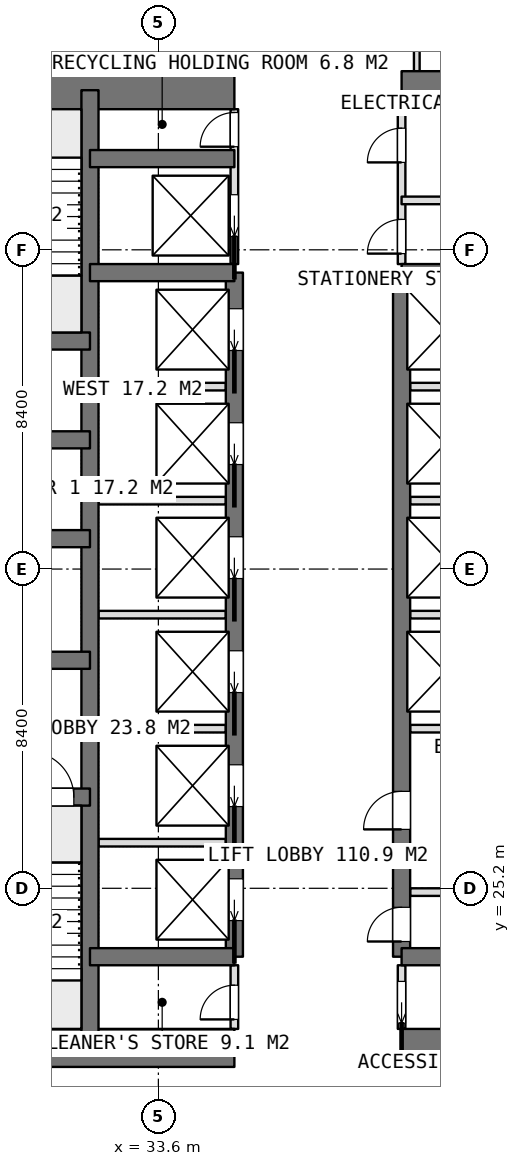
"""IFC4 building model, lengths in metres.
Left out: names, types, materials, properties, quantities, classifications, styles, units other than length and angle.
Written with IfcOpenShell. Run it as: python <this file> out.ifc"""

import sys

from ifc_helpers import new_model, si_unit, direction, frame, frame_2d, origin, place, context, subcontext, project, spatial, rectangle, extrude, element, fill, save


model = new_model("IFC4")
c1 = context("Model", 3, precision=1e-05, world=origin(), true_north=direction((0.0, 1.0)))
c2 = subcontext(c1, "Body", "Model", "MODEL_VIEW")
j1 = project(units=[si_unit("LENGTHUNIT", "METRE"), si_unit("PLANEANGLEUNIT", "RADIAN")], contexts=[c1])
p1 = place(None, origin())
s1 = spatial("IfcSite", under=j1, at=p1, CompositionType="ELEMENT")
p2 = place(p1, origin())
s2 = spatial("IfcBuilding", under=s1, at=p2, CompositionType="ELEMENT")
p3 = place(p2, frame((0.0, 0.0, 106.55)))
s3 = spatial("IfcBuildingStorey", under=s2, at=p3, CompositionType="ELEMENT", Elevation=106.55)
p4 = place(p3, frame((25.2, 21.0, 0.0), z_axis=(0.0, 0.0, 1.0), x_axis=(1.0, 0.0, 0.0)))
e1 = element("IfcWall", 1, at=p4, inside=s3, PredefinedType="SHEAR", context=c2, shape_type="SweptSolid", body=[
    extrude(rectangle(XDim=10.4, YDim=1.0, at=frame_2d((5.2, 0.0))), origin(), (0.0, 0.0, 1.0), 3.75),
])
p5 = place(p3, frame((40.0, 21.0, 0.0), z_axis=(0.0, 0.0, 1.0), x_axis=(1.0, 0.0, 0.0)))
e2 = element("IfcWall", 2, at=p5, inside=s3, PredefinedType="SHEAR", context=c2, shape_type="SweptSolid", body=[
    extrude(rectangle(XDim=10.4, YDim=1.0, at=frame_2d((5.2, 0.0))), origin(), (0.0, 0.0, 1.0), 3.75),
])
p6 = place(p3, frame((25.2, 46.2, 0.0), z_axis=(0.0, 0.0, 1.0), x_axis=(1.0, 0.0, 0.0)))
e3 = element("IfcWall", 3, at=p6, inside=s3, PredefinedType="SHEAR", context=c2, shape_type="SweptSolid", body=[
    extrude(rectangle(XDim=10.4, YDim=1.0, at=frame_2d((5.2, 0.0))), origin(), (0.0, 0.0, 1.0), 3.75),
])
p7 = place(p3, frame((40.0, 46.2, 0.0), z_axis=(0.0, 0.0, 1.0), x_axis=(1.0, 0.0, 0.0)))
e4 = element("IfcWall", 4, at=p7, inside=s3, PredefinedType="SHEAR", context=c2, shape_type="SweptSolid", body=[
    extrude(rectangle(XDim=10.4, YDim=1.0, at=frame_2d((5.2, 0.0))), origin(), (0.0, 0.0, 1.0), 3.75),
])
p8 = place(p3, frame((31.8, 21.0, 0.0), z_axis=(0.0, 0.0, 1.0), x_axis=(0.0, 1.0, 0.0)))
e5 = element("IfcWall", 5, at=p8, inside=s3, PredefinedType="SHEAR", context=c2, shape_type="SweptSolid", body=[
    extrude(rectangle(XDim=25.2, YDim=0.45, at=frame_2d((12.6, 0.0))), origin(), (0.0, 0.0, 1.0), 3.75),
])
p9 = place(p3, frame((35.6, 23.4, 0.0), z_axis=(0.0, 0.0, 1.0), x_axis=(0.0, 1.0, 0.0)))
e6 = element("IfcWall", 6, at=p9, inside=s3, PredefinedType="SHEAR", context=c2, shape_type="SweptSolid", body=[
    extrude(rectangle(XDim=18.0, YDim=0.45, at=frame_2d((9.0, 0.0))), origin(), (0.0, 0.0, 1.0), 3.75),
])
p10 = place(p9, frame((0.95, 0.0, 0.0)))
e7 = element("IfcOpeningElement", 7, at=p10, cuts=e6, PredefinedType="OPENING", context=c2, shape_type="SweptSolid", body=[
    extrude(rectangle(XDim=1.1, YDim=2.1, at=frame_2d((0.55, 1.05))), frame((0.0, 0.235, 0.0), z_axis=(0.0, -1.0, 0.0), x_axis=(1.0, 0.0, 0.0)), (0.0, 0.0, 1.0), 0.47),
])
p11 = place(p9, frame((3.95, 0.0, 0.0)))
e8 = element("IfcOpeningElement", 8, at=p11, cuts=e6, PredefinedType="OPENING", context=c2, shape_type="SweptSolid", body=[
    extrude(rectangle(XDim=1.1, YDim=2.1, at=frame_2d((0.55, 1.05))), frame((0.0, 0.235, 0.0), z_axis=(0.0, -1.0, 0.0), x_axis=(1.0, 0.0, 0.0)), (0.0, 0.0, 1.0), 0.47),
])
p12 = place(p9, frame((6.95, 0.0, 0.0)))
e9 = element("IfcOpeningElement", 9, at=p12, cuts=e6, PredefinedType="OPENING", context=c2, shape_type="SweptSolid", body=[
    extrude(rectangle(XDim=1.1, YDim=2.1, at=frame_2d((0.55, 1.05))), frame((0.0, 0.235, 0.0), z_axis=(0.0, -1.0, 0.0), x_axis=(1.0, 0.0, 0.0)), (0.0, 0.0, 1.0), 0.47),
])
p13 = place(p9, frame((9.95, 0.0, 0.0)))
e10 = element("IfcOpeningElement", 10, at=p13, cuts=e6, PredefinedType="OPENING", context=c2, shape_type="SweptSolid", body=[
    extrude(rectangle(XDim=1.1, YDim=2.1, at=frame_2d((0.55, 1.05))), frame((0.0, 0.235, 0.0), z_axis=(0.0, -1.0, 0.0), x_axis=(1.0, 0.0, 0.0)), (0.0, 0.0, 1.0), 0.47),
])
p14 = place(p9, frame((12.95, 0.0, 0.0)))
e11 = element("IfcOpeningElement", 11, at=p14, cuts=e6, PredefinedType="OPENING", context=c2, shape_type="SweptSolid", body=[
    extrude(rectangle(XDim=1.1, YDim=2.1, at=frame_2d((0.55, 1.05))), frame((0.0, 0.235, 0.0), z_axis=(0.0, -1.0, 0.0), x_axis=(1.0, 0.0, 0.0)), (0.0, 0.0, 1.0), 0.47),
])
p15 = place(p9, frame((15.95, 0.0, 0.0)))
e12 = element("IfcOpeningElement", 12, at=p15, cuts=e6, PredefinedType="OPENING", context=c2, shape_type="SweptSolid", body=[
    extrude(rectangle(XDim=1.1, YDim=2.1, at=frame_2d((0.55, 1.05))), frame((0.0, 0.235, 0.0), z_axis=(0.0, -1.0, 0.0), x_axis=(1.0, 0.0, 0.0)), (0.0, 0.0, 1.0), 0.47),
])
p16 = place(p3, frame((40.0, 23.4, 0.0), z_axis=(0.0, 0.0, 1.0), x_axis=(0.0, 1.0, 0.0)))
e13 = element("IfcWall", 13, at=p16, inside=s3, PredefinedType="SHEAR", context=c2, shape_type="SweptSolid", body=[
    extrude(rectangle(XDim=18.0, YDim=0.45, at=frame_2d((9.0, 0.0))), origin(), (0.0, 0.0, 1.0), 3.75),
])
p17 = place(p16, frame((0.4, 0.0, 0.0)))
e14 = element("IfcOpeningElement", 14, at=p17, cuts=e13, PredefinedType="OPENING", context=c2, shape_type="SweptSolid", body=[
    extrude(rectangle(XDim=0.9, YDim=2.1, at=frame_2d((0.45, 1.05))), frame((0.0, 0.235, 0.0), z_axis=(0.0, -1.0, 0.0), x_axis=(1.0, 0.0, 0.0)), (0.0, 0.0, 1.0), 0.47),
])
p18 = place(p16, frame((3.35, 0.0, 0.0)))
e15 = element("IfcOpeningElement", 15, at=p18, cuts=e13, PredefinedType="OPENING", context=c2, shape_type="SweptSolid", body=[
    extrude(rectangle(XDim=1.0, YDim=2.1, at=frame_2d((0.5, 1.05))), frame((0.0, 0.235, 0.0), z_axis=(0.0, -1.0, 0.0), x_axis=(1.0, 0.0, 0.0)), (0.0, 0.0, 1.0), 0.47),
])
for number, where, z_axis, x_axis in (
    (16, (31.8, 23.4, 0.0), (0.0, 0.0, 1.0), (1.0, 0.0, 0.0)),
    (17, (31.8, 41.4, 0.0), (0.0, 0.0, 1.0), (1.0, 0.0, 0.0)),
    (18, (31.8, 44.4, 0.0), (0.0, 0.0, 1.0), (1.0, 0.0, 0.0)),
    (19, (40.0, 23.4, 0.0), (0.0, 0.0, 1.0), (1.0, 0.0, 0.0)),
    (20, (40.0, 41.4, 0.0), (0.0, 0.0, 1.0), (1.0, 0.0, 0.0)),
):
    element("IfcWall", number, at=place(p3, frame(where, z_axis=z_axis, x_axis=x_axis)), inside=s3, PredefinedType="SHEAR", context=c2, shape_type="SweptSolid", body=[
        extrude(rectangle(XDim=3.8, YDim=0.45, at=frame_2d((1.9, 0.0))), origin(), (0.0, 0.0, 1.0), 3.75),
    ])
p19 = place(p3, frame((25.2, 27.6, 0.0), z_axis=(0.0, 0.0, 1.0), x_axis=(1.0, 0.0, 0.0)))
e21 = element("IfcWall", 21, at=p19, inside=s3, PredefinedType="SHEAR", context=c2, shape_type="SweptSolid", body=[
    extrude(rectangle(XDim=6.6, YDim=0.45, at=frame_2d((3.3, 0.0))), origin(), (0.0, 0.0, 1.0), 3.75),
])
p20 = place(p19, frame((4.975, 0.0, 0.0)))
e22 = element("IfcOpeningElement", 22, at=p20, cuts=e21, PredefinedType="OPENING", context=c2, shape_type="SweptSolid", body=[
    extrude(rectangle(XDim=1.2, YDim=2.1, at=frame_2d((0.6, 1.05))), frame((0.0, 0.235, 0.0), z_axis=(0.0, -1.0, 0.0), x_axis=(1.0, 0.0, 0.0)), (0.0, 0.0, 1.0), 0.47),
])
p21 = place(p3, frame((25.2, 31.2, 0.0), z_axis=(0.0, 0.0, 1.0), x_axis=(1.0, 0.0, 0.0)))
e23 = element("IfcWall", 23, at=p21, inside=s3, PredefinedType="SHEAR", context=c2, shape_type="SweptSolid", body=[
    extrude(rectangle(XDim=6.6, YDim=0.45, at=frame_2d((3.3, 0.0))), origin(), (0.0, 0.0, 1.0), 3.75),
])
p22 = place(p21, frame((2.65, 0.0, 0.0)))
e24 = element("IfcOpeningElement", 24, at=p22, cuts=e23, PredefinedType="OPENING", context=c2, shape_type="SweptSolid", body=[
    extrude(rectangle(XDim=1.3, YDim=2.1, at=frame_2d((0.65, 1.05))), frame((0.0, 0.235, 0.0), z_axis=(0.0, -1.0, 0.0), x_axis=(1.0, 0.0, 0.0)), (0.0, 0.0, 1.0), 0.47),
])
for number, where, z_axis, x_axis in (
    (25, (25.2, 34.4, 0.0), (0.0, 0.0, 1.0), (1.0, 0.0, 0.0)),
    (26, (25.2, 37.0, 0.0), (0.0, 0.0, 1.0), (1.0, 0.0, 0.0)),
    (27, (25.2, 39.6, 0.0), (0.0, 0.0, 1.0), (1.0, 0.0, 0.0)),
):
    element("IfcWall", number, at=place(p3, frame(where, z_axis=z_axis, x_axis=x_axis)), inside=s3, PredefinedType="SHEAR", context=c2, shape_type="SweptSolid", body=[
        extrude(rectangle(XDim=6.6, YDim=0.45, at=frame_2d((3.3, 0.0))), origin(), (0.0, 0.0, 1.0), 3.75),
    ])
for number, where, z_axis, x_axis in (
    (28, (32.025, 26.4, 0.0), (0.0, 0.0, 1.0), (1.0, 0.0, 0.0)),
    (29, (32.025, 29.4, 0.0), (0.0, 0.0, 1.0), (1.0, 0.0, 0.0)),
    (30, (32.025, 32.4, 0.0), (0.0, 0.0, 1.0), (1.0, 0.0, 0.0)),
    (31, (32.025, 35.4, 0.0), (0.0, 0.0, 1.0), (1.0, 0.0, 0.0)),
    (32, (32.025, 38.4, 0.0), (0.0, 0.0, 1.0), (1.0, 0.0, 0.0)),
):
    element("IfcWall", number, at=place(p3, frame(where, z_axis=z_axis, x_axis=x_axis)), inside=s3, PredefinedType="PARTITIONING", context=c2, shape_type="SweptSolid", body=[
        extrude(rectangle(XDim=3.35, YDim=0.2, at=frame_2d((1.675, 0.0))), origin(), (0.0, 0.0, 1.0), 3.5),
    ])
for number, where, z_axis, x_axis in (
    (33, (40.225, 29.4, 0.0), (0.0, 0.0, 1.0), (1.0, 0.0, 0.0)),
    (34, (40.225, 32.4, 0.0), (0.0, 0.0, 1.0), (1.0, 0.0, 0.0)),
    (35, (40.225, 35.4, 0.0), (0.0, 0.0, 1.0), (1.0, 0.0, 0.0)),
    (36, (40.225, 38.4, 0.0), (0.0, 0.0, 1.0), (1.0, 0.0, 0.0)),
):
    element("IfcWall", number, at=place(p3, frame(where, z_axis=z_axis, x_axis=x_axis)), inside=s3, PredefinedType="PARTITIONING", context=c2, shape_type="SweptSolid", body=[
        extrude(rectangle(XDim=3.35, YDim=0.2, at=frame_2d((1.675, 0.0))), origin(), (0.0, 0.0, 1.0), 3.5),
    ])
p23 = place(p3, frame((40.0, 21.5, 0.0), z_axis=(0.0, 0.0, 1.0), x_axis=(0.0, 1.0, 0.0)))
e37 = element("IfcWall", 37, at=p23, inside=s3, PredefinedType="PARTITIONING", context=c2, shape_type="SweptSolid", body=[
    extrude(rectangle(XDim=1.675, YDim=0.2, at=frame_2d((0.837, 0.0))), origin(), (0.0, 0.0, 1.0), 3.5),
])
p24 = place(p23, frame((0.15, 0.0, 0.0)))
e38 = element("IfcOpeningElement", 38, at=p24, cuts=e37, PredefinedType="OPENING", context=c2, shape_type="SweptSolid", body=[
    extrude(rectangle(XDim=1.1, YDim=2.1, at=frame_2d((0.55, 1.05))), frame((0.0, 0.11, 0.0), z_axis=(0.0, -1.0, 0.0), x_axis=(1.0, 0.0, 0.0)), (0.0, 0.0, 1.0), 0.22),
])
p25 = place(p3, frame((40.0, 41.625, 0.0), z_axis=(0.0, 0.0, 1.0), x_axis=(0.0, 1.0, 0.0)))
e39 = element("IfcWall", 39, at=p25, inside=s3, PredefinedType="PARTITIONING", context=c2, shape_type="SweptSolid", body=[
    extrude(rectangle(XDim=4.075, YDim=0.2, at=frame_2d((2.038, 0.0))), origin(), (0.0, 0.0, 1.0), 3.5),
])
p26 = place(p25, frame((2.675, 0.0, 0.0)))
e40 = element("IfcOpeningElement", 40, at=p26, cuts=e39, PredefinedType="OPENING", context=c2, shape_type="SweptSolid", body=[
    extrude(rectangle(XDim=0.9, YDim=2.1, at=frame_2d((0.45, 1.05))), frame((0.0, 0.11, 0.0), z_axis=(0.0, -1.0, 0.0), x_axis=(1.0, 0.0, 0.0)), (0.0, 0.0, 1.0), 0.22),
])
p27 = place(p25, frame((0.275, 0.0, 0.0)))
e41 = element("IfcOpeningElement", 41, at=p27, cuts=e39, PredefinedType="OPENING", context=c2, shape_type="SweptSolid", body=[
    extrude(rectangle(XDim=0.9, YDim=2.1, at=frame_2d((0.45, 1.05))), frame((0.0, 0.11, 0.0), z_axis=(0.0, -1.0, 0.0), x_axis=(1.0, 0.0, 0.0)), (0.0, 0.0, 1.0), 0.22),
])
p28 = place(p3, frame((35.6, 41.625, 0.0), z_axis=(0.0, 0.0, 1.0), x_axis=(0.0, 1.0, 0.0)))
e42 = element("IfcWall", 42, at=p28, inside=s3, PredefinedType="PARTITIONING", context=c2, shape_type="SweptSolid", body=[
    extrude(rectangle(XDim=4.075, YDim=0.2, at=frame_2d((2.038, 0.0))), origin(), (0.0, 0.0, 1.0), 3.5),
])
p29 = place(p28, frame((3.088, 0.0, 0.0)))
e43 = element("IfcOpeningElement", 43, at=p29, cuts=e42, PredefinedType="OPENING", context=c2, shape_type="SweptSolid", body=[
    extrude(rectangle(XDim=0.9, YDim=2.1, at=frame_2d((0.45, 1.05))), frame((0.0, 0.11, 0.0), z_axis=(0.0, -1.0, 0.0), x_axis=(1.0, 0.0, 0.0)), (0.0, 0.0, 1.0), 0.22),
])
p30 = place(p28, frame((0.725, 0.0, 0.0)))
e44 = element("IfcOpeningElement", 44, at=p30, cuts=e42, PredefinedType="OPENING", context=c2, shape_type="SweptSolid", body=[
    extrude(rectangle(XDim=1.1, YDim=2.1, at=frame_2d((0.55, 1.05))), frame((0.0, 0.11, 0.0), z_axis=(0.0, -1.0, 0.0), x_axis=(1.0, 0.0, 0.0)), (0.0, 0.0, 1.0), 0.22),
])
p31 = place(p3, frame((35.6, 21.5, 0.0), z_axis=(0.0, 0.0, 1.0), x_axis=(0.0, 1.0, 0.0)))
e45 = element("IfcWall", 45, at=p31, inside=s3, PredefinedType="PARTITIONING", context=c2, shape_type="SweptSolid", body=[
    extrude(rectangle(XDim=1.675, YDim=0.2, at=frame_2d((0.837, 0.0))), origin(), (0.0, 0.0, 1.0), 3.5),
])
p32 = place(p31, frame((0.25, 0.0, 0.0)))
e46 = element("IfcOpeningElement", 46, at=p32, cuts=e45, PredefinedType="OPENING", context=c2, shape_type="SweptSolid", body=[
    extrude(rectangle(XDim=0.9, YDim=2.1, at=frame_2d((0.45, 1.05))), frame((0.0, 0.11, 0.0), z_axis=(0.0, -1.0, 0.0), x_axis=(1.0, 0.0, 0.0)), (0.0, 0.0, 1.0), 0.22),
])
p33 = place(p3, frame((40.225, 25.1, 0.0), z_axis=(0.0, 0.0, 1.0), x_axis=(1.0, 0.0, 0.0)))
e47 = element("IfcWall", 47, at=p33, inside=s3, PredefinedType="PARTITIONING", context=c2, shape_type="SweptSolid", body=[
    extrude(rectangle(XDim=3.35, YDim=0.2, at=frame_2d((1.675, 0.0))), origin(), (0.0, 0.0, 1.0), 3.5),
])
p34 = place(p3, frame((40.0, 43.3, 0.0), z_axis=(0.0, 0.0, 1.0), x_axis=(1.0, 0.0, 0.0)))
e48 = element("IfcWall", 48, at=p34, inside=s3, PredefinedType="PARTITIONING", context=c2, shape_type="SweptSolid", body=[
    extrude(rectangle(XDim=3.575, YDim=0.2, at=frame_2d((1.788, 0.0))), origin(), (0.0, 0.0, 1.0), 3.5),
])
for number, where, z_axis, x_axis in (
    (49, (40.4, 46.7, 0.0), (0.0, 0.0, 1.0), (0.0, 1.0, 0.0)),
    (50, (35.2, 46.7, 0.0), (0.0, 0.0, 1.0), (0.0, 1.0, 0.0)),
):
    element("IfcWall", number, at=place(p3, frame(where, z_axis=z_axis, x_axis=x_axis)), inside=s3, PredefinedType="PARTITIONING", context=c2, shape_type="SweptSolid", body=[
        extrude(rectangle(XDim=2.625, YDim=0.15, at=frame_2d((1.312, 0.0))), origin(), (0.0, 0.0, 1.0), 3.5),
    ])
p35 = place(p24, origin())
e51 = element("IfcDoor", 51, at=p35, inside=s3, OperationType="SLIDING_TO_LEFT", PredefinedType="DOOR", context=c2, shape_type="SweptSolid", body=[
    extrude(rectangle(XDim=1.1, YDim=2.1, at=frame_2d((0.55, 1.05))), frame((0.0, 0.025, 0.0), z_axis=(0.0, -1.0, 0.0), x_axis=(1.0, 0.0, 0.0)), (0.0, 0.0, 1.0), 0.05),
])
fill(e38, e51)
p36 = place(p32, origin())
e52 = element("IfcDoor", 52, at=p36, inside=s3, OperationType="SINGLE_SWING_LEFT", PredefinedType="DOOR", context=c2, shape_type="SweptSolid", body=[
    extrude(rectangle(XDim=0.9, YDim=2.1, at=frame_2d((0.45, 1.05))), frame((0.0, 0.025, 0.0), z_axis=(0.0, -1.0, 0.0), x_axis=(1.0, 0.0, 0.0)), (0.0, 0.0, 1.0), 0.05),
])
fill(e46, e52)
p37 = place(p26, origin())
e53 = element("IfcDoor", 53, at=p37, inside=s3, OperationType="SINGLE_SWING_LEFT", PredefinedType="DOOR", context=c2, shape_type="SweptSolid", body=[
    extrude(rectangle(XDim=0.9, YDim=2.1, at=frame_2d((0.45, 1.05))), frame((0.0, 0.025, 0.0), z_axis=(0.0, -1.0, 0.0), x_axis=(1.0, 0.0, 0.0)), (0.0, 0.0, 1.0), 0.05),
])
fill(e40, e53)
p38 = place(p27, origin())
e54 = element("IfcDoor", 54, at=p38, inside=s3, OperationType="SINGLE_SWING_LEFT", PredefinedType="DOOR", context=c2, shape_type="SweptSolid", body=[
    extrude(rectangle(XDim=0.9, YDim=2.1, at=frame_2d((0.45, 1.05))), frame((0.0, 0.025, 0.0), z_axis=(0.0, -1.0, 0.0), x_axis=(1.0, 0.0, 0.0)), (0.0, 0.0, 1.0), 0.05),
])
fill(e41, e54)
p39 = place(p17, origin())
e55 = element("IfcDoor", 55, at=p39, inside=s3, OperationType="SINGLE_SWING_LEFT", PredefinedType="DOOR", context=c2, shape_type="SweptSolid", body=[
    extrude(rectangle(XDim=0.9, YDim=2.1, at=frame_2d((0.45, 1.05))), frame((0.0, 0.025, 0.0), z_axis=(0.0, -1.0, 0.0), x_axis=(1.0, 0.0, 0.0)), (0.0, 0.0, 1.0), 0.05),
])
fill(e14, e55)
p40 = place(p18, origin())
e56 = element("IfcDoor", 56, at=p40, inside=s3, OperationType="SINGLE_SWING_LEFT", PredefinedType="DOOR", context=c2, shape_type="SweptSolid", body=[
    extrude(rectangle(XDim=1.0, YDim=2.1, at=frame_2d((0.5, 1.05))), frame((0.0, 0.025, 0.0), z_axis=(0.0, -1.0, 0.0), x_axis=(1.0, 0.0, 0.0)), (0.0, 0.0, 1.0), 0.05),
])
fill(e15, e56)
p41 = place(p29, origin())
e57 = element("IfcDoor", 57, at=p41, inside=s3, OperationType="SINGLE_SWING_LEFT", PredefinedType="DOOR", context=c2, shape_type="SweptSolid", body=[
    extrude(rectangle(XDim=0.9, YDim=2.1, at=frame_2d((0.45, 1.05))), frame((0.0, 0.025, 0.0), z_axis=(0.0, -1.0, 0.0), x_axis=(1.0, 0.0, 0.0)), (0.0, 0.0, 1.0), 0.05),
])
fill(e43, e57)
p42 = place(p10, origin())
e58 = element("IfcDoor", 58, at=p42, inside=s3, OperationType="SLIDING_TO_LEFT", PredefinedType="USERDEFINED", context=c2, shape_type="SweptSolid", body=[
    extrude(rectangle(XDim=1.1, YDim=2.1, at=frame_2d((0.55, 1.05))), frame((0.0, 0.025, 0.0), z_axis=(0.0, -1.0, 0.0), x_axis=(1.0, 0.0, 0.0)), (0.0, 0.0, 1.0), 0.05),
])
fill(e7, e58)
p43 = place(p11, origin())
e59 = element("IfcDoor", 59, at=p43, inside=s3, OperationType="SLIDING_TO_LEFT", PredefinedType="USERDEFINED", context=c2, shape_type="SweptSolid", body=[
    extrude(rectangle(XDim=1.1, YDim=2.1, at=frame_2d((0.55, 1.05))), frame((0.0, 0.025, 0.0), z_axis=(0.0, -1.0, 0.0), x_axis=(1.0, 0.0, 0.0)), (0.0, 0.0, 1.0), 0.05),
])
fill(e8, e59)
p44 = place(p12, origin())
e60 = element("IfcDoor", 60, at=p44, inside=s3, OperationType="SLIDING_TO_LEFT", PredefinedType="USERDEFINED", context=c2, shape_type="SweptSolid", body=[
    extrude(rectangle(XDim=1.1, YDim=2.1, at=frame_2d((0.55, 1.05))), frame((0.0, 0.025, 0.0), z_axis=(0.0, -1.0, 0.0), x_axis=(1.0, 0.0, 0.0)), (0.0, 0.0, 1.0), 0.05),
])
fill(e9, e60)
p45 = place(p13, origin())
e61 = element("IfcDoor", 61, at=p45, inside=s3, OperationType="SLIDING_TO_LEFT", PredefinedType="USERDEFINED", context=c2, shape_type="SweptSolid", body=[
    extrude(rectangle(XDim=1.1, YDim=2.1, at=frame_2d((0.55, 1.05))), frame((0.0, 0.025, 0.0), z_axis=(0.0, -1.0, 0.0), x_axis=(1.0, 0.0, 0.0)), (0.0, 0.0, 1.0), 0.05),
])
fill(e10, e61)
p46 = place(p14, origin())
e62 = element("IfcDoor", 62, at=p46, inside=s3, OperationType="SLIDING_TO_LEFT", PredefinedType="USERDEFINED", context=c2, shape_type="SweptSolid", body=[
    extrude(rectangle(XDim=1.1, YDim=2.1, at=frame_2d((0.55, 1.05))), frame((0.0, 0.025, 0.0), z_axis=(0.0, -1.0, 0.0), x_axis=(1.0, 0.0, 0.0)), (0.0, 0.0, 1.0), 0.05),
])
fill(e11, e62)
p47 = place(p15, origin())
e63 = element("IfcDoor", 63, at=p47, inside=s3, OperationType="SLIDING_TO_LEFT", PredefinedType="USERDEFINED", context=c2, shape_type="SweptSolid", body=[
    extrude(rectangle(XDim=1.1, YDim=2.1, at=frame_2d((0.55, 1.05))), frame((0.0, 0.025, 0.0), z_axis=(0.0, -1.0, 0.0), x_axis=(1.0, 0.0, 0.0)), (0.0, 0.0, 1.0), 0.05),
])
fill(e12, e63)
p48 = place(p30, origin())
e64 = element("IfcDoor", 64, at=p48, inside=s3, OperationType="SLIDING_TO_LEFT", PredefinedType="USERDEFINED", context=c2, shape_type="SweptSolid", body=[
    extrude(rectangle(XDim=1.1, YDim=2.1, at=frame_2d((0.55, 1.05))), frame((0.0, 0.025, 0.0), z_axis=(0.0, -1.0, 0.0), x_axis=(1.0, 0.0, 0.0)), (0.0, 0.0, 1.0), 0.05),
])
fill(e44, e64)
p49 = place(p20, origin())
e65 = element("IfcDoor", 65, at=p49, inside=s3, OperationType="SINGLE_SWING_RIGHT", PredefinedType="DOOR", context=c2, shape_type="SweptSolid", body=[
    extrude(rectangle(XDim=1.2, YDim=2.1, at=frame_2d((0.6, 1.05))), frame((0.0, 0.025, 0.0), z_axis=(0.0, -1.0, 0.0), x_axis=(1.0, 0.0, 0.0)), (0.0, 0.0, 1.0), 0.05),
])
fill(e22, e65)
save(model, sys.argv[1])
